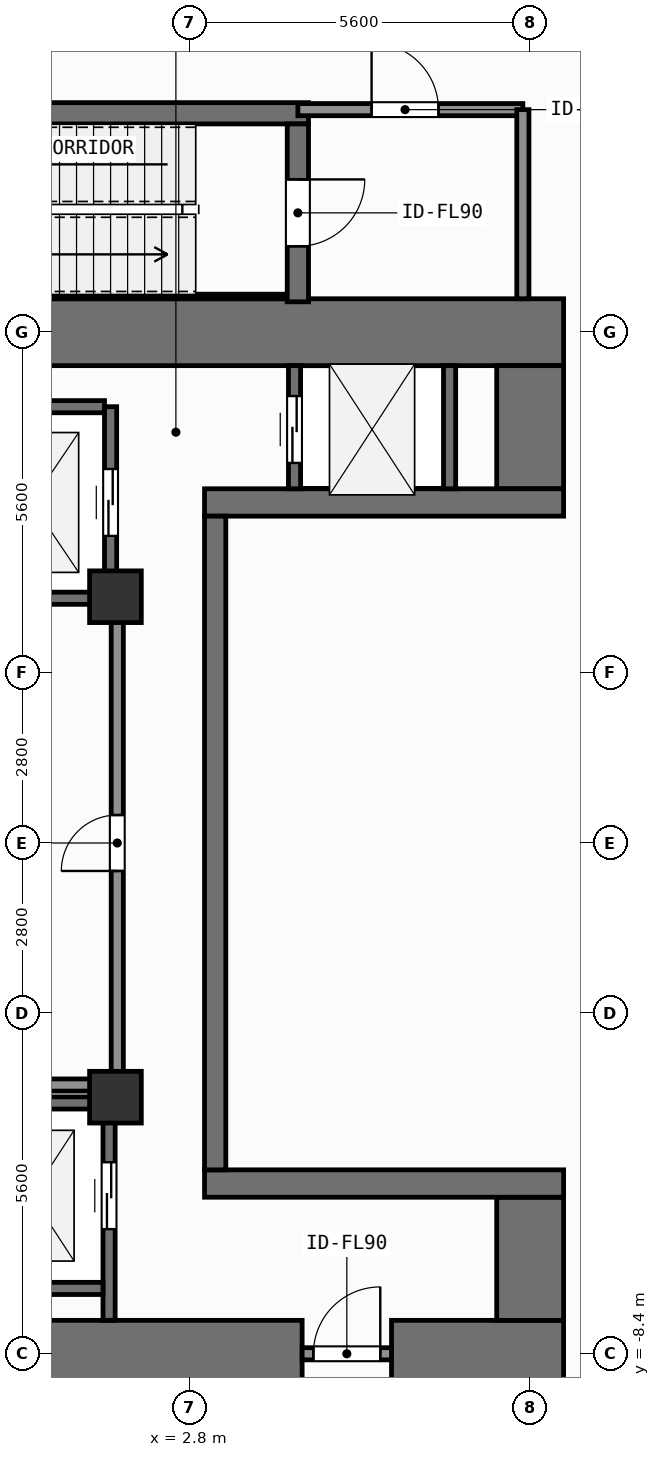
"""IFC4 building model, lengths in metres.
Left out: names, types, materials, properties, quantities, classifications, styles, units other than length and angle.
Written with IfcOpenShell. Run it as: python <this file> out.ifc"""

import sys

from ifc_helpers import new_model, si_unit, direction, frame, frame_2d, origin, origin_2d, place, context, subcontext, project, spatial, rectangle, extrude, element, fill, save


model = new_model("IFC4")
c1 = context("Model", 3, precision=1e-05, world=origin(), true_north=direction((0.0, 1.0)))
c2 = subcontext(c1, "Body", "Model", "MODEL_VIEW")
j1 = project(units=[si_unit("LENGTHUNIT", "METRE"), si_unit("PLANEANGLEUNIT", "RADIAN")], contexts=[c1])
p1 = place(None, origin())
s1 = spatial("IfcSite", under=j1, at=p1, CompositionType="ELEMENT")
p2 = place(p1, origin())
s2 = spatial("IfcBuilding", under=s1, at=p2, CompositionType="ELEMENT")
p3 = place(p2, frame((0.0, 0.0, 13.2)))
s3 = spatial("IfcBuildingStorey", under=s2, at=p3, CompositionType="ELEMENT", Elevation=13.2)
p4 = place(p3, frame((-2.62, -8.4, 0.0), z_axis=(0.0, 0.0, 1.0), x_axis=(1.0, 0.0, 0.0)))
e1 = element("IfcWall", 1, at=p4, inside=s3, PredefinedType="SHEAR", context=c2, shape_type="SweptSolid", body=[
    extrude(rectangle(XDim=7.27, YDim=1.1, at=frame_2d((3.635, 0.0))), origin(), (0.0, 0.0, 1.0), 4.2),
])
p5 = place(p3, frame((6.12, -8.4, 0.0), z_axis=(0.0, 0.0, 1.0), x_axis=(1.0, 0.0, 0.0)))
e2 = element("IfcWall", 2, at=p5, inside=s3, PredefinedType="SHEAR", context=c2, shape_type="SweptSolid", body=[
    extrude(rectangle(XDim=2.83, YDim=1.1, at=frame_2d((1.415, 0.0))), origin(), (0.0, 0.0, 1.0), 4.2),
])
p6 = place(p3, frame((-7.55, 8.4, 0.0), z_axis=(0.0, 0.0, 1.0), x_axis=(1.0, 0.0, 0.0)))
e3 = element("IfcWall", 3, at=p6, inside=s3, PredefinedType="SHEAR", context=c2, shape_type="SweptSolid", body=[
    extrude(rectangle(XDim=16.5, YDim=1.1, at=frame_2d((8.25, 0.0))), origin(), (0.0, 0.0, 1.0), 4.2),
])
for number, where, z_axis, x_axis in (
    (4, (8.4, -7.85, 0.0), (0.0, 0.0, 1.0), (0.0, 1.0, 0.0)),
    (5, (8.4, 5.825, 0.0), (0.0, 0.0, 1.0), (0.0, 1.0, 0.0)),
):
    element("IfcWall", number, at=place(p3, frame(where, z_axis=z_axis, x_axis=x_axis)), inside=s3, PredefinedType="SHEAR", context=c2, shape_type="SweptSolid", body=[
        extrude(rectangle(XDim=2.025, YDim=1.1, at=frame_2d((1.013, 0.0))), origin(), (0.0, 0.0, 1.0), 4.2),
    ])
for number, where, z_axis, x_axis in (
    (6, (3.045, -5.6, 0.0), (0.0, 0.0, 1.0), (1.0, 0.0, 0.0)),
    (7, (3.045, 5.6, 0.0), (0.0, 0.0, 1.0), (1.0, 0.0, 0.0)),
):
    element("IfcWall", number, at=place(p3, frame(where, z_axis=z_axis, x_axis=x_axis)), inside=s3, PredefinedType="SHEAR", context=c2, shape_type="SweptSolid", body=[
        extrude(rectangle(XDim=5.905, YDim=0.45, at=frame_2d((2.953, 0.0))), origin(), (0.0, 0.0, 1.0), 4.2),
    ])
p7 = place(p3, frame((3.22, -5.375, 0.0), z_axis=(0.0, 0.0, 1.0), x_axis=(0.0, 1.0, 0.0)))
e8 = element("IfcWall", 8, at=p7, inside=s3, PredefinedType="SHEAR", context=c2, shape_type="SweptSolid", body=[
    extrude(rectangle(XDim=10.75, YDim=0.35, at=frame_2d((5.375, 0.0))), origin(), (0.0, 0.0, 1.0), 4.2),
])
p8 = place(p3, frame((-2.555, 12.0, 0.0), z_axis=(0.0, 0.0, 1.0), x_axis=(1.0, 0.0, 0.0)))
e9 = element("IfcWall", 9, at=p8, inside=s3, PredefinedType="SHEAR", context=c2, shape_type="SweptSolid", body=[
    extrude(rectangle(XDim=7.31, YDim=0.35, at=frame_2d((3.655, 0.0))), origin(), (0.0, 0.0, 1.0), 4.2),
])
p9 = place(p3, frame((-2.2, 8.988, 0.0), z_axis=(0.0, 0.0, 1.0), x_axis=(1.0, 0.0, 0.0)))
e10 = element("IfcWall", 10, at=p9, inside=s3, PredefinedType="SHEAR", context=c2, shape_type="SweptSolid", body=[
    extrude(rectangle(XDim=6.6, YDim=0.075, at=frame_2d((3.3, 0.0))), origin(), (0.0, 0.0, 1.0), 4.2),
])
p10 = place(p3, frame((4.58, 11.825, 0.0), z_axis=(0.0, 0.0, 1.0), x_axis=(0.0, -1.0, 0.0)))
e11 = element("IfcWall", 11, at=p10, inside=s3, PredefinedType="SHEAR", context=c2, shape_type="SweptSolid", body=[
    extrude(rectangle(XDim=2.925, YDim=0.35, at=frame_2d((1.462, 0.0))), origin(), (0.0, 0.0, 1.0), 4.2),
])
p11 = place(p10, frame((0.913, 0.0, 0.0)))
e12 = element("IfcOpeningElement", 12, at=p11, cuts=e11, PredefinedType="OPENING", context=c2, shape_type="SweptSolid", body=[
    extrude(rectangle(XDim=1.1, YDim=2.15, at=frame_2d((0.55, 1.075))), frame((0.0, 0.185, 0.0), z_axis=(0.0, -1.0, 0.0), x_axis=(1.0, 0.0, 0.0)), (0.0, 0.0, 1.0), 0.37),
])
for number, where, z_axis, x_axis in (
    (13, (1.58, -4.18, 0.0), (0.0, 0.0, 1.0), (1.0, 0.0, 0.0)),
    (14, (1.58, 4.05, 0.0), (0.0, 0.0, 1.0), (1.0, 0.0, 0.0)),
):
    element("IfcColumn", number, at=place(p3, frame(where, z_axis=z_axis, x_axis=x_axis)), inside=s3, PredefinedType="COLUMN", context=c2, shape_type="SweptSolid", body=[
        extrude(rectangle(XDim=0.85, YDim=0.85, at=origin_2d()), origin(), (0.0, 0.0, 1.0), 4.2),
    ])
p12 = place(p3, frame((1.5, 4.025, 0.0), z_axis=(0.0, 0.0, 1.0), x_axis=(0.0, 1.0, 0.0)))
e15 = element("IfcWall", 15, at=p12, inside=s3, PredefinedType="SHEAR", context=c2, shape_type="SweptSolid", body=[
    extrude(rectangle(XDim=3.15, YDim=0.2, at=frame_2d((1.575, 0.0))), origin(), (0.0, 0.0, 1.0), 3.96),
])
p13 = place(p12, frame((1.025, 0.0, 0.0)))
e16 = element("IfcOpeningElement", 16, at=p13, cuts=e15, PredefinedType="OPENING", context=c2, shape_type="SweptSolid", body=[
    extrude(rectangle(XDim=1.1, YDim=2.2, at=frame_2d((0.55, 1.1))), frame((0.0, 0.11, 0.0), z_axis=(0.0, -1.0, 0.0), x_axis=(1.0, 0.0, 0.0)), (0.0, 0.0, 1.0), 0.22),
])
for number, where, z_axis, x_axis in (
    (17, (-1.0, 4.025, 0.0), (0.0, 0.0, 1.0), (1.0, 0.0, 0.0)),
    (18, (-1.0, 7.175, 0.0), (0.0, 0.0, 1.0), (1.0, 0.0, 0.0)),
):
    element("IfcWall", number, at=place(p3, frame(where, z_axis=z_axis, x_axis=x_axis)), inside=s3, PredefinedType="SHEAR", context=c2, shape_type="SweptSolid", body=[
        extrude(rectangle(XDim=2.4, YDim=0.2, at=frame_2d((1.2, 0.0))), origin(), (0.0, 0.0, 1.0), 3.96),
    ])
p14 = place(p3, frame((1.475, -7.85, 0.0), z_axis=(0.0, 0.0, 1.0), x_axis=(0.0, 1.0, 0.0)))
e19 = element("IfcWall", 19, at=p14, inside=s3, PredefinedType="SHEAR", context=c2, shape_type="SweptSolid", body=[
    extrude(rectangle(XDim=3.575, YDim=0.2, at=frame_2d((1.788, 0.0))), origin(), (0.0, 0.0, 1.0), 3.96),
])
p15 = place(p14, frame((1.5, 0.0, 0.0)))
e20 = element("IfcOpeningElement", 20, at=p15, cuts=e19, PredefinedType="OPENING", context=c2, shape_type="SweptSolid", body=[
    extrude(rectangle(XDim=1.1, YDim=2.2, at=frame_2d((0.55, 1.1))), frame((0.0, 0.11, 0.0), z_axis=(0.0, -1.0, 0.0), x_axis=(1.0, 0.0, 0.0)), (0.0, 0.0, 1.0), 0.22),
])
for number, where, z_axis, x_axis in (
    (21, (-0.975, -7.325, 0.0), (0.0, 0.0, 1.0), (1.0, 0.0, 0.0)),
    (22, (-0.975, -4.275, 0.0), (0.0, 0.0, 1.0), (1.0, 0.0, 0.0)),
):
    element("IfcWall", number, at=place(p3, frame(where, z_axis=z_axis, x_axis=x_axis)), inside=s3, PredefinedType="SHEAR", context=c2, shape_type="SweptSolid", body=[
        extrude(rectangle(XDim=2.35, YDim=0.2, at=frame_2d((1.175, 0.0))), origin(), (0.0, 0.0, 1.0), 3.96),
    ])
p16 = place(p3, frame((4.525, 5.825, 0.0), z_axis=(0.0, 0.0, 1.0), x_axis=(0.0, 1.0, 0.0)))
e23 = element("IfcWall", 23, at=p16, inside=s3, PredefinedType="SHEAR", context=c2, shape_type="SweptSolid", body=[
    extrude(rectangle(XDim=2.025, YDim=0.2, at=frame_2d((1.013, 0.0))), origin(), (0.0, 0.0, 1.0), 3.96),
])
p17 = place(p16, frame((0.425, 0.0, 0.0)))
e24 = element("IfcOpeningElement", 24, at=p17, cuts=e23, PredefinedType="OPENING", context=c2, shape_type="SweptSolid", body=[
    extrude(rectangle(XDim=1.1, YDim=2.2, at=frame_2d((0.55, 1.1))), frame((0.0, 0.11, 0.0), z_axis=(0.0, -1.0, 0.0), x_axis=(1.0, 0.0, 0.0)), (0.0, 0.0, 1.0), 0.22),
])
p18 = place(p3, frame((7.075, 5.825, 0.0), z_axis=(0.0, 0.0, 1.0), x_axis=(0.0, 1.0, 0.0)))
e25 = element("IfcWall", 25, at=p18, inside=s3, PredefinedType="SHEAR", context=c2, shape_type="SweptSolid", body=[
    extrude(rectangle(XDim=2.025, YDim=0.2, at=frame_2d((1.013, 0.0))), origin(), (0.0, 0.0, 1.0), 3.96),
])
p19 = place(p3, frame((4.65, -8.4, 0.0), z_axis=(0.0, 0.0, 1.0), x_axis=(1.0, 0.0, 0.0)))
e26 = element("IfcWall", 26, at=p19, inside=s3, PredefinedType="SOLIDWALL", context=c2, shape_type="SweptSolid", body=[
    extrude(rectangle(XDim=1.47, YDim=0.2, at=frame_2d((0.735, 0.0))), origin(), (0.0, 0.0, 1.0), 3.0),
])
p20 = place(p19, frame((0.185, 0.0, 0.0)))
e27 = element("IfcOpeningElement", 27, at=p20, cuts=e26, PredefinedType="OPENING", context=c2, shape_type="SweptSolid", body=[
    extrude(rectangle(XDim=1.1, YDim=2.15, at=frame_2d((0.55, 1.075))), frame((0.0, 0.11, 0.0), z_axis=(0.0, -1.0, 0.0), x_axis=(1.0, 0.0, 0.0)), (0.0, 0.0, 1.0), 0.22),
])
p21 = place(p3, frame((4.58, 12.06, 0.0), z_axis=(0.0, 0.0, 1.0), x_axis=(1.0, 0.0, 0.0)))
e28 = element("IfcWall", 28, at=p21, inside=s3, PredefinedType="SOLIDWALL", context=c2, shape_type="SweptSolid", body=[
    extrude(rectangle(XDim=3.7, YDim=0.2, at=frame_2d((1.85, 0.0))), origin(), (0.0, 0.0, 1.0), 3.96),
])
p22 = place(p21, frame((1.212, 0.0, 0.0)))
e29 = element("IfcOpeningElement", 29, at=p22, cuts=e28, PredefinedType="OPENING", context=c2, shape_type="SweptSolid", body=[
    extrude(rectangle(XDim=1.1, YDim=2.15, at=frame_2d((0.55, 1.075))), frame((0.0, 0.11, 0.0), z_axis=(0.0, -1.0, 0.0), x_axis=(1.0, 0.0, 0.0)), (0.0, 0.0, 1.0), 0.22),
])
p23 = place(p3, frame((1.61, -3.98, 0.0), z_axis=(0.0, 0.0, 1.0), x_axis=(0.0, 1.0, 0.0)))
e30 = element("IfcWall", 30, at=p23, inside=s3, PredefinedType="SOLIDWALL", context=c2, shape_type="SweptSolid", body=[
    extrude(rectangle(XDim=7.96, YDim=0.2, at=frame_2d((3.98, 0.0))), origin(), (0.0, 0.0, 1.0), 3.96),
])
p24 = place(p23, frame((3.52, 0.0, 0.0)))
e31 = element("IfcOpeningElement", 31, at=p24, cuts=e30, PredefinedType="OPENING", context=c2, shape_type="SweptSolid", body=[
    extrude(rectangle(XDim=0.92, YDim=2.1, at=frame_2d((0.46, 1.05))), frame((0.0, 0.11, 0.0), z_axis=(0.0, -1.0, 0.0), x_axis=(1.0, 0.0, 0.0)), (0.0, 0.0, 1.0), 0.22),
])
p25 = place(p3, frame((8.28, 8.95, 0.0), z_axis=(0.0, 0.0, 1.0), x_axis=(0.0, 1.0, 0.0)))
e32 = element("IfcWall", 32, at=p25, inside=s3, PredefinedType="SOLIDWALL", context=c2, shape_type="SweptSolid", body=[
    extrude(rectangle(XDim=3.11, YDim=0.2, at=frame_2d((1.555, 0.0))), origin(), (0.0, 0.0, 1.0), 3.96),
])
p26 = place(p3, frame((-1.58, -3.98, 0.0), z_axis=(0.0, 0.0, 1.0), x_axis=(1.0, 0.0, 0.0)))
e33 = element("IfcWall", 33, at=p26, inside=s3, PredefinedType="SOLIDWALL", context=c2, shape_type="SweptSolid", body=[
    extrude(rectangle(XDim=3.19, YDim=0.2, at=frame_2d((1.595, 0.0))), origin(), (0.0, 0.0, 1.0), 3.96),
])
p27 = place(p13, origin())
e34 = element("IfcDoor", 34, at=p27, inside=s3, OperationType="SLIDING_TO_LEFT", PredefinedType="DOOR", context=c2, shape_type="SweptSolid", body=[
    extrude(rectangle(XDim=1.1, YDim=2.2, at=frame_2d((0.55, 1.1))), frame((0.0, 0.025, 0.0), z_axis=(0.0, -1.0, 0.0), x_axis=(1.0, 0.0, 0.0)), (0.0, 0.0, 1.0), 0.05),
])
fill(e16, e34)
p28 = place(p15, origin())
e35 = element("IfcDoor", 35, at=p28, inside=s3, OperationType="SLIDING_TO_LEFT", PredefinedType="DOOR", context=c2, shape_type="SweptSolid", body=[
    extrude(rectangle(XDim=1.1, YDim=2.2, at=frame_2d((0.55, 1.1))), frame((0.0, 0.025, 0.0), z_axis=(0.0, -1.0, 0.0), x_axis=(1.0, 0.0, 0.0)), (0.0, 0.0, 1.0), 0.05),
])
fill(e20, e35)
p29 = place(p17, origin())
e36 = element("IfcDoor", 36, at=p29, inside=s3, OperationType="SLIDING_TO_LEFT", PredefinedType="DOOR", context=c2, shape_type="SweptSolid", body=[
    extrude(rectangle(XDim=1.1, YDim=2.2, at=frame_2d((0.55, 1.1))), frame((0.0, 0.025, 0.0), z_axis=(0.0, -1.0, 0.0), x_axis=(1.0, 0.0, 0.0)), (0.0, 0.0, 1.0), 0.05),
])
fill(e24, e36)
p30 = place(p11, origin())
e37 = element("IfcDoor", 37, at=p30, inside=s3, OperationType="SINGLE_SWING_LEFT", PredefinedType="DOOR", context=c2, shape_type="SweptSolid", body=[
    extrude(rectangle(XDim=1.1, YDim=2.15, at=frame_2d((0.55, 1.075))), frame((0.0, 0.025, 0.0), z_axis=(0.0, -1.0, 0.0), x_axis=(1.0, 0.0, 0.0)), (0.0, 0.0, 1.0), 0.05),
])
fill(e12, e37)
p31 = place(p20, origin())
e38 = element("IfcDoor", 38, at=p31, inside=s3, OperationType="SINGLE_SWING_RIGHT", PredefinedType="DOOR", context=c2, shape_type="SweptSolid", body=[
    extrude(rectangle(XDim=1.1, YDim=2.15, at=frame_2d((0.55, 1.075))), frame((0.0, 0.025, 0.0), z_axis=(0.0, -1.0, 0.0), x_axis=(1.0, 0.0, 0.0)), (0.0, 0.0, 1.0), 0.05),
])
fill(e27, e38)
p32 = place(p22, origin())
e39 = element("IfcDoor", 39, at=p32, inside=s3, OperationType="SINGLE_SWING_LEFT", PredefinedType="DOOR", context=c2, shape_type="SweptSolid", body=[
    extrude(rectangle(XDim=1.1, YDim=2.15, at=frame_2d((0.55, 1.075))), frame((0.0, 0.025, 0.0), z_axis=(0.0, -1.0, 0.0), x_axis=(1.0, 0.0, 0.0)), (0.0, 0.0, 1.0), 0.05),
])
fill(e29, e39)
p33 = place(p24, origin())
e40 = element("IfcDoor", 40, at=p33, inside=s3, OperationType="SINGLE_SWING_LEFT", PredefinedType="DOOR", context=c2, shape_type="SweptSolid", body=[
    extrude(rectangle(XDim=0.92, YDim=2.1, at=frame_2d((0.46, 1.05))), frame((0.0, 0.025, 0.0), z_axis=(0.0, -1.0, 0.0), x_axis=(1.0, 0.0, 0.0)), (0.0, 0.0, 1.0), 0.05),
])
fill(e31, e40)
save(model, sys.argv[1])
